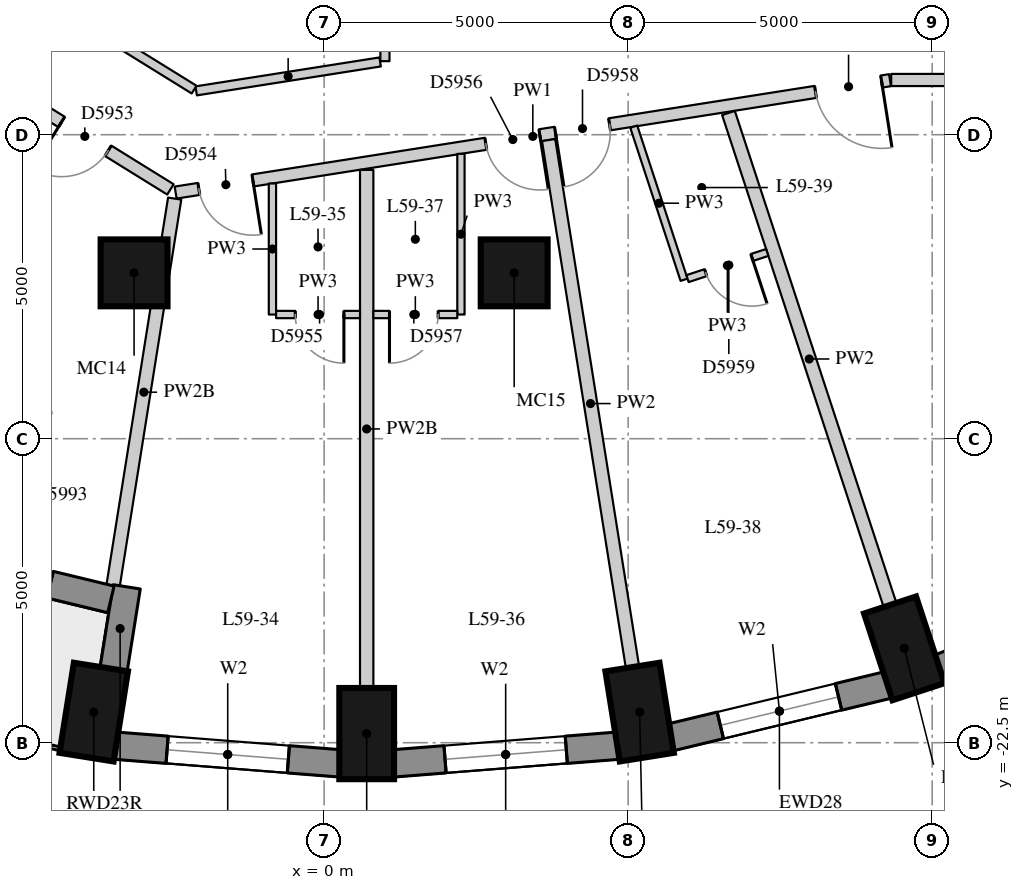
"""IFC4 building model, lengths in metres.
Left out: names, types, materials, properties, quantities, classifications, styles, units other than length and angle.
Written with IfcOpenShell. Run it as: python <this file> out.ifc"""

import sys

from ifc_helpers import new_model, si_unit, direction, frame, frame_2d, origin, origin_2d, place, context, subcontext, project, spatial, rectangle, extrude, element, fill, save


model = new_model("IFC4")
c1 = context("Model", 3, precision=1e-05, world=origin(), true_north=direction((0.0, 1.0)))
c2 = subcontext(c1, "Body", "Model", "MODEL_VIEW")
j1 = project(units=[si_unit("LENGTHUNIT", "METRE"), si_unit("PLANEANGLEUNIT", "RADIAN")], contexts=[c1])
p1 = place(None, origin())
s1 = spatial("IfcSite", under=j1, at=p1, CompositionType="ELEMENT")
p2 = place(p1, origin())
s2 = spatial("IfcBuilding", under=s1, at=p2, CompositionType="ELEMENT")
p3 = place(p2, frame((0.0, 0.0, 209.0)))
s3 = spatial("IfcBuildingStorey", under=s2, at=p3, CompositionType="ELEMENT", Elevation=209.0)
for number, where, z_axis, x_axis in (
    (1, (-3.789, -21.997, 0.0), (0.0, 0.0, 1.0), (-0.157, -0.988, 0.0)),
    (2, (0.7, -22.35, 0.0), (0.0, 0.0, 1.0), (0.0, -1.0, 0.0)),
    (3, (5.189, -21.997, 0.0), (0.0, 0.0, 1.0), (0.157, -0.988, 0.0)),
    (4, (9.541, -20.948, 0.0), (0.0, 0.0, 1.0), (0.312, -0.95, 0.0)),
):
    element("IfcColumn", number, at=place(p3, frame(where, z_axis=z_axis, x_axis=x_axis)), inside=s3, PredefinedType="COLUMN", context=c2, shape_type="SweptSolid", body=[
        extrude(rectangle(XDim=1.5, YDim=0.9, at=origin_2d()), origin(), (0.0, 0.0, 1.0), 3.3),
    ])
for number, where, z_axis, x_axis in (
    (5, (-3.126, -14.772, 0.0), (0.0, 0.0, 1.0), (1.0, 0.0, 0.0)),
    (6, (3.126, -14.772, 0.0), (0.0, 0.0, 1.0), (1.0, 0.0, 0.0)),
):
    element("IfcColumn", number, at=place(p3, frame(where, z_axis=z_axis, x_axis=x_axis)), inside=s3, PredefinedType="COLUMN", context=c2, shape_type="SweptSolid", body=[
        extrude(rectangle(XDim=1.1, YDim=1.1, at=origin_2d()), origin(), (0.0, 0.0, 1.0), 3.3),
    ])
p4 = place(p3, frame((-3.441, -22.548, 0.0), z_axis=(0.0, 0.0, 1.0), x_axis=(0.996913971077, -0.078501810629, 0.0)))
e7 = element("IfcWall", 7, at=p4, inside=s3, PredefinedType="SOLIDWALL", context=c2, shape_type="SweptSolid", body=[
    extrude(rectangle(XDim=3.723, YDim=0.45, at=frame_2d((1.861, 0.0))), origin(), (0.0, 0.0, 1.0), 3.02),
])
p5 = place(p4, frame((0.861, 0.0, 0.4)))
e8 = element("IfcOpeningElement", 8, at=p5, cuts=e7, PredefinedType="OPENING", context=c2, shape_type="SweptSolid", body=[
    extrude(rectangle(XDim=2.0, YDim=1.75, at=frame_2d((1.0, 0.875))), frame((0.0, 0.235, 0.0), z_axis=(0.0, -1.0, 0.0), x_axis=(1.0, 0.0, 0.0)), (0.0, 0.0, 1.0), 0.47),
])
p6 = place(p3, frame((1.13, -22.841, 0.0), z_axis=(0.0, 0.0, 1.0), x_axis=(0.996913566885, 0.078506943392, 0.0)))
e9 = element("IfcWall", 9, at=p6, inside=s3, PredefinedType="SOLIDWALL", context=c2, shape_type="SweptSolid", body=[
    extrude(rectangle(XDim=3.722, YDim=0.45, at=frame_2d((1.861, 0.0))), origin(), (0.0, 0.0, 1.0), 3.02),
])
p7 = place(p6, frame((0.861, 0.0, 0.4)))
e10 = element("IfcOpeningElement", 10, at=p7, cuts=e9, PredefinedType="OPENING", context=c2, shape_type="SweptSolid", body=[
    extrude(rectangle(XDim=2.0, YDim=1.75, at=frame_2d((1.0, 0.875))), frame((0.0, 0.235, 0.0), z_axis=(0.0, -1.0, 0.0), x_axis=(1.0, 0.0, 0.0)), (0.0, 0.0, 1.0), 0.47),
])
p8 = place(p3, frame((5.691, -22.414, 0.0), z_axis=(0.0, 0.0, 1.0), x_axis=(0.9721584944, 0.234324266275, 0.0)))
e11 = element("IfcWall", 11, at=p8, inside=s3, PredefinedType="SOLIDWALL", context=c2, shape_type="SweptSolid", body=[
    extrude(rectangle(XDim=3.698, YDim=0.45, at=frame_2d((1.849, 0.0))), origin(), (0.0, 0.0, 1.0), 3.02),
])
p9 = place(p8, frame((0.849, 0.0, 0.4)))
e12 = element("IfcOpeningElement", 12, at=p9, cuts=e11, PredefinedType="OPENING", context=c2, shape_type="SweptSolid", body=[
    extrude(rectangle(XDim=2.0, YDim=1.75, at=frame_2d((1.0, 0.875))), frame((0.0, 0.235, 0.0), z_axis=(0.0, -1.0, 0.0), x_axis=(1.0, 0.0, 0.0)), (0.0, 0.0, 1.0), 0.47),
])
p10 = place(p3, frame((10.103, -21.279, 0.0), z_axis=(0.0, 0.0, 1.0), x_axis=(0.922168222612, 0.386789050006, 0.0)))
e13 = element("IfcWall", 13, at=p10, inside=s3, PredefinedType="SOLIDWALL", context=c2, shape_type="SweptSolid", body=[
    extrude(rectangle(XDim=3.651, YDim=0.45, at=frame_2d((1.825, 0.0))), origin(), (0.0, 0.0, 1.0), 3.02),
])
p11 = place(p10, frame((0.825, 0.0, 0.4)))
e14 = element("IfcOpeningElement", 14, at=p11, cuts=e13, PredefinedType="OPENING", context=c2, shape_type="SweptSolid", body=[
    extrude(rectangle(XDim=2.0, YDim=1.75, at=frame_2d((1.0, 0.875))), frame((0.0, 0.235, 0.0), z_axis=(0.0, -1.0, 0.0), x_axis=(1.0, 0.0, 0.0)), (0.0, 0.0, 1.0), 0.47),
])
p12 = place(p3, frame((-3.464, -21.309, 0.0), z_axis=(0.0, 0.0, 1.0), x_axis=(0.157161757203, 0.98757287431, 0.0)))
e15 = element("IfcWall", 15, at=p12, inside=s3, PredefinedType="SOLIDWALL", context=c2, shape_type="SweptSolid", body=[
    extrude(rectangle(XDim=1.39, YDim=0.45, at=frame_2d((0.695, 0.0))), origin(), (0.0, 0.0, 1.0), 2.57),
])
p13 = place(p3, frame((-7.596, -19.154, 0.0), z_axis=(0.0, 0.0, 1.0), x_axis=(0.972004107579, -0.234963858602, 0.0)))
e16 = element("IfcWall", 16, at=p13, inside=s3, PredefinedType="SOLIDWALL", context=c2, shape_type="SweptSolid", body=[
    extrude(rectangle(XDim=4.207, YDim=0.45, at=frame_2d((2.104, 0.0))), origin(), (0.0, 0.0, 1.0), 3.02),
])
p14 = place(p13, frame((1.029, 0.0, 0.4)))
e17 = element("IfcOpeningElement", 17, at=p14, cuts=e16, PredefinedType="OPENING", context=c2, shape_type="SweptSolid", body=[
    extrude(rectangle(XDim=1.0, YDim=1.75, at=frame_2d((0.5, 0.875))), frame((0.0, 0.235, 0.0), z_axis=(0.0, -1.0, 0.0), x_axis=(1.0, 0.0, 0.0)), (0.0, 0.0, 1.0), 0.47),
])
p15 = place(p13, frame((2.179, 0.0, 0.0)))
e18 = element("IfcOpeningElement", 18, at=p15, cuts=e16, PredefinedType="OPENING", context=c2, shape_type="SweptSolid", body=[
    extrude(rectangle(XDim=1.0, YDim=2.15, at=frame_2d((0.5, 1.075))), frame((0.0, 0.235, 0.0), z_axis=(0.0, -1.0, 0.0), x_axis=(1.0, 0.0, 0.0)), (0.0, 0.0, 1.0), 0.47),
])
p16 = place(p3, frame((17.5, -11.6, 0.0), z_axis=(0.0, 0.0, 1.0), x_axis=(-1.0, 0.0, 0.0)))
e19 = element("IfcWall", 19, at=p16, inside=s3, PredefinedType="PARTITIONING", context=c2, shape_type="SweptSolid", body=[
    extrude(rectangle(XDim=8.174, YDim=0.2, at=frame_2d((4.087, 0.0))), origin(), (0.0, 0.0, 1.0), 3.02),
])
p17 = place(p16, frame((1.208, 0.0, 0.0)))
e20 = element("IfcOpeningElement", 20, at=p17, cuts=e19, PredefinedType="OPENING", context=c2, shape_type="SweptSolid", body=[
    extrude(rectangle(XDim=1.8, YDim=2.1, at=frame_2d((0.9, 1.05))), frame((0.0, 0.11, 0.0), z_axis=(0.0, -1.0, 0.0), x_axis=(1.0, 0.0, 0.0)), (0.0, 0.0, 1.0), 0.22),
])
p18 = place(p3, frame((9.306, -11.603, 0.0), z_axis=(0.0, 0.0, 1.0), x_axis=(-0.987842562114, -0.155457622769, 0.0)))
e21 = element("IfcWall", 21, at=p18, inside=s3, PredefinedType="PARTITIONING", context=c2, shape_type="SweptSolid", body=[
    extrude(rectangle(XDim=11.893, YDim=0.2, at=frame_2d((5.947, 0.0))), origin(), (0.0, 0.0, 1.0), 3.02),
])
p19 = place(p18, frame((10.607, 0.0, 0.0)))
e22 = element("IfcOpeningElement", 22, at=p19, cuts=e21, PredefinedType="OPENING", context=c2, shape_type="SweptSolid", body=[
    extrude(rectangle(XDim=0.9, YDim=2.1, at=frame_2d((0.45, 1.05))), frame((0.0, 0.11, 0.0), z_axis=(0.0, -1.0, 0.0), x_axis=(1.0, 0.0, 0.0)), (0.0, 0.0, 1.0), 0.22),
])
p20 = place(p18, frame((5.829, 0.0, 0.0)))
e23 = element("IfcOpeningElement", 23, at=p20, cuts=e21, PredefinedType="OPENING", context=c2, shape_type="SweptSolid", body=[
    extrude(rectangle(XDim=0.9, YDim=2.1, at=frame_2d((0.45, 1.05))), frame((0.0, 0.11, 0.0), z_axis=(0.0, -1.0, 0.0), x_axis=(1.0, 0.0, 0.0)), (0.0, 0.0, 1.0), 0.22),
])
p21 = place(p18, frame((4.669, 0.0, 0.0)))
e24 = element("IfcOpeningElement", 24, at=p21, cuts=e21, PredefinedType="OPENING", context=c2, shape_type="SweptSolid", body=[
    extrude(rectangle(XDim=0.9, YDim=2.1, at=frame_2d((0.45, 1.05))), frame((0.0, 0.11, 0.0), z_axis=(0.0, -1.0, 0.0), x_axis=(1.0, 0.0, 0.0)), (0.0, 0.0, 1.0), 0.22),
])
p22 = place(p18, frame((0.14, 0.0, 0.0)))
e25 = element("IfcOpeningElement", 25, at=p22, cuts=e21, PredefinedType="OPENING", context=c2, shape_type="SweptSolid", body=[
    extrude(rectangle(XDim=1.1, YDim=2.1, at=frame_2d((0.55, 1.05))), frame((0.0, 0.11, 0.0), z_axis=(0.0, -1.0, 0.0), x_axis=(1.0, 0.0, 0.0)), (0.0, 0.0, 1.0), 0.22),
])
p23 = place(p3, frame((-2.528, -13.4, 0.0), z_axis=(0.0, 0.0, 1.0), x_axis=(-0.850088088191, 0.526640524757, 0.0)))
e26 = element("IfcWall", 26, at=p23, inside=s3, PredefinedType="PARTITIONING", context=c2, shape_type="SweptSolid", body=[
    extrude(rectangle(XDim=6.084, YDim=0.2, at=frame_2d((3.042, 0.0))), origin(), (0.0, 0.0, 1.0), 3.02),
])
p24 = place(p23, frame((4.031, 0.0, 0.0)))
e27 = element("IfcOpeningElement", 27, at=p24, cuts=e26, PredefinedType="OPENING", context=c2, shape_type="SweptSolid", body=[
    extrude(rectangle(XDim=1.1, YDim=2.1, at=frame_2d((0.55, 1.05))), frame((0.0, 0.11, 0.0), z_axis=(0.0, -1.0, 0.0), x_axis=(1.0, 0.0, 0.0)), (0.0, 0.0, 1.0), 0.22),
])
p25 = place(p23, frame((1.206, 0.0, 0.0)))
e28 = element("IfcOpeningElement", 28, at=p25, cuts=e26, PredefinedType="OPENING", context=c2, shape_type="SweptSolid", body=[
    extrude(rectangle(XDim=0.9, YDim=2.1, at=frame_2d((0.45, 1.05))), frame((0.0, 0.11, 0.0), z_axis=(0.0, -1.0, 0.0), x_axis=(1.0, 0.0, 0.0)), (0.0, 0.0, 1.0), 0.22),
])
p26 = place(p3, frame((1.0, -9.23, 0.0), z_axis=(0.0, 0.0, 1.0), x_axis=(0.0, -1.0, 0.0)))
e29 = element("IfcWall", 29, at=p26, inside=s3, PredefinedType="PARTITIONING", context=c2, shape_type="SweptSolid", body=[
    extrude(rectangle(XDim=2.061, YDim=0.15, at=frame_2d((1.03, 0.0))), origin(), (0.0, 0.0, 1.0), 3.02),
])
p27 = place(p3, frame((0.921, -11.303, 0.0), z_axis=(0.0, 0.0, 1.0), x_axis=(-0.987854584084, -0.15538121091, 0.0)))
e30 = element("IfcWall", 30, at=p27, inside=s3, PredefinedType="PARTITIONING", context=c2, shape_type="SweptSolid", body=[
    extrude(rectangle(XDim=3.062, YDim=0.15, at=frame_2d((1.531, 0.0))), origin(), (0.0, 0.0, 1.0), 3.02),
])
p28 = place(p3, frame((-2.138, -11.758, 0.0), z_axis=(0.0, 0.0, 1.0), x_axis=(-0.850109654363, 0.526605711666, 0.0)))
e31 = element("IfcWall", 31, at=p28, inside=s3, PredefinedType="PARTITIONING", context=c2, shape_type="SweptSolid", body=[
    extrude(rectangle(XDim=2.778, YDim=0.15, at=frame_2d((1.389, 0.0))), origin(), (0.0, 0.0, 1.0), 3.02),
])
p29 = place(p3, frame((-3.471, -19.919, 0.0), z_axis=(0.0, 0.0, 1.0), x_axis=(0.157082319053, 0.987585512774, 0.0)))
e32 = element("IfcWall", 32, at=p29, inside=s3, PredefinedType="PARTITIONING", context=c2, shape_type="SweptSolid", body=[
    extrude(rectangle(XDim=6.448, YDim=0.22, at=frame_2d((3.224, 0.0))), origin(), (0.0, 0.0, 1.0), 2.57),
])
p30 = place(p3, frame((0.7, -21.6, 0.0), z_axis=(0.0, 0.0, 1.0), x_axis=(0.0, 1.0, 0.0)))
e33 = element("IfcWall", 33, at=p30, inside=s3, PredefinedType="PARTITIONING", context=c2, shape_type="SweptSolid", body=[
    extrude(rectangle(XDim=8.521, YDim=0.22, at=frame_2d((4.261, 0.0))), origin(), (0.0, 0.0, 1.0), 2.57),
])
p31 = place(p3, frame((5.071, -21.256, 0.0), z_axis=(0.0, 0.0, 1.0), x_axis=(-0.157132312818, 0.987577559622, 0.0)))
e34 = element("IfcWall", 34, at=p31, inside=s3, PredefinedType="PARTITIONING", context=c2, shape_type="SweptSolid", body=[
    extrude(rectangle(XDim=8.777, YDim=0.22, at=frame_2d((4.389, 0.0))), origin(), (0.0, 0.0, 1.0), 3.02),
])
p32 = place(p3, frame((9.307, -20.235, 0.0), z_axis=(0.0, 0.0, 1.0), x_axis=(-0.311959631661, 0.950095357432, 0.0)))
e35 = element("IfcWall", 35, at=p32, inside=s3, PredefinedType="PARTITIONING", context=c2, shape_type="SweptSolid", body=[
    extrude(rectangle(XDim=8.518, YDim=0.22, at=frame_2d((4.259, 0.0))), origin(), (0.0, 0.0, 1.0), 3.02),
])
p33 = place(p3, frame((-0.85, -13.303, 0.0), z_axis=(0.0, 0.0, 1.0), x_axis=(0.0, -1.0, 0.0)))
e36 = element("IfcWall", 36, at=p33, inside=s3, PredefinedType="PARTITIONING", context=c2, shape_type="SweptSolid", body=[
    extrude(rectangle(XDim=2.155, YDim=0.12, at=frame_2d((1.077, 0.0))), origin(), (0.0, 0.0, 1.0), 3.02),
])
p34 = place(p3, frame((2.25, -12.815, 0.0), z_axis=(0.0, 0.0, 1.0), x_axis=(0.0, -1.0, 0.0)))
e37 = element("IfcWall", 37, at=p34, inside=s3, PredefinedType="PARTITIONING", context=c2, shape_type="SweptSolid", body=[
    extrude(rectangle(XDim=2.643, YDim=0.12, at=frame_2d((1.321, 0.0))), origin(), (0.0, 0.0, 1.0), 3.02),
])
p35 = place(p3, frame((5.092, -12.368, 0.0), z_axis=(0.0, 0.0, 1.0), x_axis=(0.311969203188, -0.95009221461, 0.0)))
e38 = element("IfcWall", 38, at=p35, inside=s3, PredefinedType="PARTITIONING", context=c2, shape_type="SweptSolid", body=[
    extrude(rectangle(XDim=2.651, YDim=0.12, at=frame_2d((1.325, 0.0))), origin(), (0.0, 0.0, 1.0), 3.02),
])
p36 = place(p3, frame((-0.79, -15.458, 0.0), z_axis=(0.0, 0.0, 1.0), x_axis=(1.0, 0.0, 0.0)))
e39 = element("IfcWall", 39, at=p36, inside=s3, PredefinedType="PARTITIONING", context=c2, shape_type="SweptSolid", body=[
    extrude(rectangle(XDim=1.38, YDim=0.12, at=frame_2d((0.69, 0.0))), origin(), (0.0, 0.0, 1.0), 3.02),
])
p37 = place(p36, frame((0.315, 0.0, 0.0)))
e40 = element("IfcOpeningElement", 40, at=p37, cuts=e39, PredefinedType="OPENING", context=c2, shape_type="SweptSolid", body=[
    extrude(rectangle(XDim=0.8, YDim=2.1, at=frame_2d((0.4, 1.05))), frame((0.0, 0.07, 0.0), z_axis=(0.0, -1.0, 0.0), x_axis=(1.0, 0.0, 0.0)), (0.0, 0.0, 1.0), 0.14),
])
p38 = place(p3, frame((2.19, -15.458, 0.0), z_axis=(0.0, 0.0, 1.0), x_axis=(-1.0, 0.0, 0.0)))
e41 = element("IfcWall", 41, at=p38, inside=s3, PredefinedType="PARTITIONING", context=c2, shape_type="SweptSolid", body=[
    extrude(rectangle(XDim=1.38, YDim=0.12, at=frame_2d((0.69, 0.0))), origin(), (0.0, 0.0, 1.0), 3.02),
])
p39 = place(p38, frame((0.315, 0.0, 0.0)))
e42 = element("IfcOpeningElement", 42, at=p39, cuts=e41, PredefinedType="OPENING", context=c2, shape_type="SweptSolid", body=[
    extrude(rectangle(XDim=0.8, YDim=2.1, at=frame_2d((0.4, 1.05))), frame((0.0, 0.07, 0.0), z_axis=(0.0, -1.0, 0.0), x_axis=(1.0, 0.0, 0.0)), (0.0, 0.0, 1.0), 0.14),
])
p40 = place(p3, frame((5.976, -14.867, 0.0), z_axis=(0.0, 0.0, 1.0), x_axis=(0.950123887932, 0.311872726573, 0.0)))
e43 = element("IfcWall", 43, at=p40, inside=s3, PredefinedType="PARTITIONING", context=c2, shape_type="SweptSolid", body=[
    extrude(rectangle(XDim=1.38, YDim=0.12, at=frame_2d((0.69, 0.0))), origin(), (0.0, 0.0, 1.0), 3.02),
])
p41 = place(p40, frame((0.315, 0.0, 0.0)))
e44 = element("IfcOpeningElement", 44, at=p41, cuts=e43, PredefinedType="OPENING", context=c2, shape_type="SweptSolid", body=[
    extrude(rectangle(XDim=0.8, YDim=2.1, at=frame_2d((0.4, 1.05))), frame((0.0, 0.07, 0.0), z_axis=(0.0, -1.0, 0.0), x_axis=(1.0, 0.0, 0.0)), (0.0, 0.0, 1.0), 0.14),
])
p42 = place(p5, origin())
e45 = element("IfcWindow", 45, at=p42, inside=s3, PartitioningType="SINGLE_PANEL", PredefinedType="WINDOW", context=c2, shape_type="SweptSolid", body=[
    extrude(rectangle(XDim=2.0, YDim=1.75, at=frame_2d((1.0, 0.875))), frame((0.0, 0.035, 0.0), z_axis=(0.0, -1.0, 0.0), x_axis=(1.0, 0.0, 0.0)), (0.0, 0.0, 1.0), 0.06),
])
fill(e8, e45)
p43 = place(p7, origin())
e46 = element("IfcWindow", 46, at=p43, inside=s3, PartitioningType="SINGLE_PANEL", PredefinedType="WINDOW", context=c2, shape_type="SweptSolid", body=[
    extrude(rectangle(XDim=2.0, YDim=1.75, at=frame_2d((1.0, 0.875))), frame((0.0, 0.035, 0.0), z_axis=(0.0, -1.0, 0.0), x_axis=(1.0, 0.0, 0.0)), (0.0, 0.0, 1.0), 0.06),
])
fill(e10, e46)
p44 = place(p9, origin())
e47 = element("IfcWindow", 47, at=p44, inside=s3, PartitioningType="SINGLE_PANEL", PredefinedType="WINDOW", context=c2, shape_type="SweptSolid", body=[
    extrude(rectangle(XDim=2.0, YDim=1.75, at=frame_2d((1.0, 0.875))), frame((0.0, 0.035, 0.0), z_axis=(0.0, -1.0, 0.0), x_axis=(1.0, 0.0, 0.0)), (0.0, 0.0, 1.0), 0.06),
])
fill(e12, e47)
p45 = place(p25, origin())
e48 = element("IfcDoor", 48, at=p45, inside=s3, OperationType="SINGLE_SWING_RIGHT", PredefinedType="DOOR", context=c2, shape_type="SweptSolid", body=[
    extrude(rectangle(XDim=0.9, YDim=2.1, at=frame_2d((0.45, 1.05))), frame((0.0, 0.025, 0.0), z_axis=(0.0, -1.0, 0.0), x_axis=(1.0, 0.0, 0.0)), (0.0, 0.0, 1.0), 0.05),
])
fill(e28, e48)
p46 = place(p19, origin())
e49 = element("IfcDoor", 49, at=p46, inside=s3, OperationType="SINGLE_SWING_LEFT", PredefinedType="DOOR", context=c2, shape_type="SweptSolid", body=[
    extrude(rectangle(XDim=0.9, YDim=2.1, at=frame_2d((0.45, 1.05))), frame((0.0, 0.025, 0.0), z_axis=(0.0, -1.0, 0.0), x_axis=(1.0, 0.0, 0.0)), (0.0, 0.0, 1.0), 0.05),
])
fill(e22, e49)
p47 = place(p37, origin())
e50 = element("IfcDoor", 50, at=p47, inside=s3, OperationType="SINGLE_SWING_LEFT", PredefinedType="DOOR", context=c2, shape_type="SweptSolid", body=[
    extrude(rectangle(XDim=0.8, YDim=2.1, at=frame_2d((0.4, 1.05))), frame((0.0, 0.025, 0.0), z_axis=(0.0, -1.0, 0.0), x_axis=(1.0, 0.0, 0.0)), (0.0, 0.0, 1.0), 0.05),
])
fill(e40, e50)
p48 = place(p20, origin())
e51 = element("IfcDoor", 51, at=p48, inside=s3, OperationType="SINGLE_SWING_LEFT", PredefinedType="DOOR", context=c2, shape_type="SweptSolid", body=[
    extrude(rectangle(XDim=0.9, YDim=2.1, at=frame_2d((0.45, 1.05))), frame((0.0, 0.025, 0.0), z_axis=(0.0, -1.0, 0.0), x_axis=(1.0, 0.0, 0.0)), (0.0, 0.0, 1.0), 0.05),
])
fill(e23, e51)
p49 = place(p39, origin())
e52 = element("IfcDoor", 52, at=p49, inside=s3, OperationType="SINGLE_SWING_RIGHT", PredefinedType="DOOR", context=c2, shape_type="SweptSolid", body=[
    extrude(rectangle(XDim=0.8, YDim=2.1, at=frame_2d((0.4, 1.05))), frame((0.0, 0.025, 0.0), z_axis=(0.0, -1.0, 0.0), x_axis=(1.0, 0.0, 0.0)), (0.0, 0.0, 1.0), 0.05),
])
fill(e42, e52)
p50 = place(p21, origin())
e53 = element("IfcDoor", 53, at=p50, inside=s3, OperationType="SINGLE_SWING_RIGHT", PredefinedType="DOOR", context=c2, shape_type="SweptSolid", body=[
    extrude(rectangle(XDim=0.9, YDim=2.1, at=frame_2d((0.45, 1.05))), frame((0.0, 0.025, 0.0), z_axis=(0.0, -1.0, 0.0), x_axis=(1.0, 0.0, 0.0)), (0.0, 0.0, 1.0), 0.05),
])
fill(e24, e53)
p51 = place(p41, origin())
e54 = element("IfcDoor", 54, at=p51, inside=s3, OperationType="SINGLE_SWING_LEFT", PredefinedType="DOOR", context=c2, shape_type="SweptSolid", body=[
    extrude(rectangle(XDim=0.8, YDim=2.1, at=frame_2d((0.4, 1.05))), frame((0.0, 0.025, 0.0), z_axis=(0.0, -1.0, 0.0), x_axis=(1.0, 0.0, 0.0)), (0.0, 0.0, 1.0), 0.05),
])
fill(e44, e54)
p52 = place(p22, origin())
e55 = element("IfcDoor", 55, at=p52, inside=s3, OperationType="SINGLE_SWING_LEFT", PredefinedType="DOOR", context=c2, shape_type="SweptSolid", body=[
    extrude(rectangle(XDim=1.1, YDim=2.1, at=frame_2d((0.55, 1.05))), frame((0.0, 0.025, 0.0), z_axis=(0.0, -1.0, 0.0), x_axis=(1.0, 0.0, 0.0)), (0.0, 0.0, 1.0), 0.05),
])
fill(e25, e55)
save(model, sys.argv[1])
